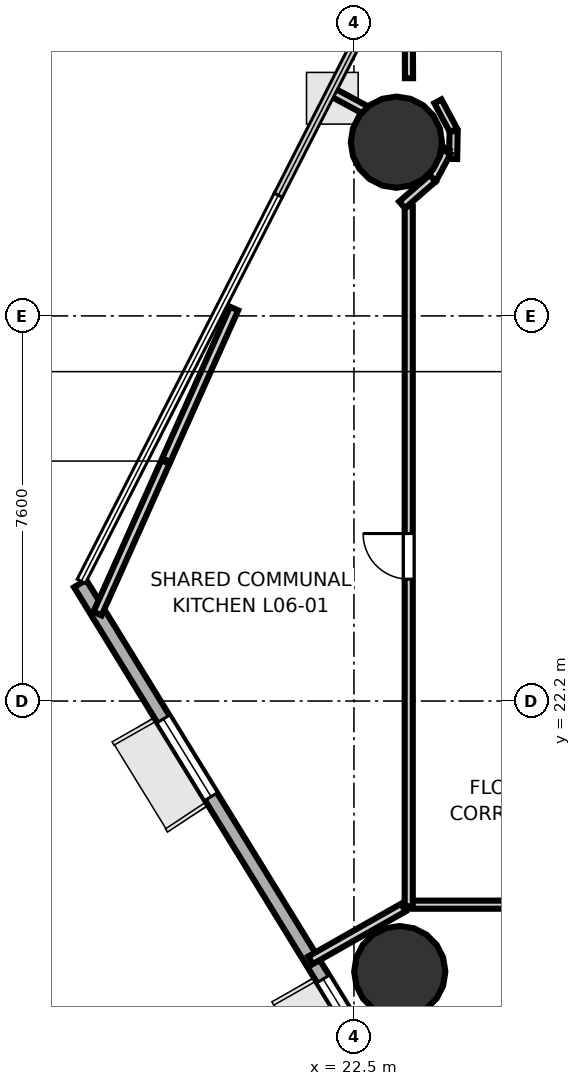
"""IFC4 building model, lengths in metres.
Left out: names, types, materials, properties, quantities, classifications, styles, units other than length and angle.
Written with IfcOpenShell. Run it as: python <this file> out.ifc"""

import sys

from ifc_helpers import new_model, si_unit, direction, frame, frame_2d, origin, origin_2d, place, context, subcontext, project, spatial, rectangle, hollow_circle, extrude, element, fill, save


model = new_model("IFC4")
c1 = context("Model", 3, precision=1e-05, world=origin(), true_north=direction((0.0, 1.0)))
c2 = subcontext(c1, "Body", "Model", "MODEL_VIEW")
j1 = project(units=[si_unit("LENGTHUNIT", "METRE"), si_unit("PLANEANGLEUNIT", "RADIAN")], contexts=[c1])
p1 = place(None, origin())
s1 = spatial("IfcSite", under=j1, at=p1, CompositionType="ELEMENT")
p2 = place(p1, origin())
s2 = spatial("IfcBuilding", under=s1, at=p2, CompositionType="ELEMENT")
p3 = place(p2, frame((0.0, 0.0, 29.4)))
s3 = spatial("IfcBuildingStorey", under=s2, at=p3, CompositionType="ELEMENT", Elevation=29.4)
for number, where, z_axis, x_axis in (
    (1, (23.338, 33.228, 0.0), (0.0, 0.0, 1.0), (1.0, 0.0, 0.0)),
    (2, (23.404, 16.86, 0.0), (0.0, 0.0, 1.0), (1.0, 0.0, 0.0)),
):
    element("IfcColumn", number, at=place(p3, frame(where, z_axis=z_axis, x_axis=x_axis)), inside=s3, PredefinedType="COLUMN", context=c2, shape_type="SweptSolid", body=[
        extrude(hollow_circle(Radius=0.9, WallThickness=0.045, at=origin_2d()), origin(), (0.0, 0.0, 1.0), 3.7),
    ])
p4 = place(p3, frame((17.096, 24.519, 0.0), z_axis=(0.0, 0.0, 1.0), x_axis=(0.523599306322, -0.851964650921, 0.0)))
e3 = element("IfcWall", 3, at=p4, inside=s3, PredefinedType="SOLIDWALL", context=c2, shape_type="SweptSolid", body=[
    extrude(rectangle(XDim=13.457, YDim=0.28, at=frame_2d((6.728, 0.0))), origin(), (0.0, 0.0, 1.0), 3.52),
])
p5 = place(p4, frame((3.137, 0.0, 0.85)))
e4 = element("IfcOpeningElement", 4, at=p5, cuts=e3, PredefinedType="OPENING", context=c2, shape_type="SweptSolid", body=[
    extrude(rectangle(XDim=1.8, YDim=2.1, at=frame_2d((0.9, 1.05))), frame((0.0, 0.15, 0.0), z_axis=(0.0, -1.0, 0.0), x_axis=(1.0, 0.0, 0.0)), (0.0, 0.0, 1.0), 0.3),
])
p6 = place(p4, frame((9.16, 0.0, 0.85)))
e5 = element("IfcOpeningElement", 5, at=p6, cuts=e3, PredefinedType="OPENING", context=c2, shape_type="SweptSolid", body=[
    extrude(rectangle(XDim=1.8, YDim=2.1, at=frame_2d((0.9, 1.05))), frame((0.0, 0.15, 0.0), z_axis=(0.0, -1.0, 0.0), x_axis=(1.0, 0.0, 0.0)), (0.0, 0.0, 1.0), 0.3),
])
p7 = place(p3, frame((24.464, 33.461, 0.0), z_axis=(0.0, 0.0, 1.0), x_axis=(-0.4715232649, 0.881853622014, 0.0)))
e6 = element("IfcWall", 6, at=p7, inside=s3, PredefinedType="PARTITIONING", context=c2, shape_type="SweptSolid", body=[
    extrude(rectangle(XDim=0.65, YDim=0.16, at=frame_2d((0.325, 0.0))), origin(), (0.0, 0.0, 1.0), 2.798),
])
p8 = place(p3, frame((23.587, 34.491, 0.0), z_axis=(0.0, 0.0, 1.0), x_axis=(-0.003825594781, 0.999992682386, 0.0)))
e7 = element("IfcWall", 7, at=p8, inside=s3, PredefinedType="PARTITIONING", context=c2, shape_type="SweptSolid", body=[
    extrude(rectangle(XDim=2.744, YDim=0.16, at=frame_2d((1.372, 0.0))), origin(), (0.0, 0.0, 1.0), 2.84),
])
p9 = place(p3, frame((33.32, 18.181, 0.0), z_axis=(0.0, 0.0, 1.0), x_axis=(-1.0, 0.0, 0.0)))
e8 = element("IfcWall", 8, at=p9, inside=s3, PredefinedType="PARTITIONING", context=c2, shape_type="SweptSolid", body=[
    extrude(rectangle(XDim=9.77, YDim=0.16, at=frame_2d((4.885, 0.0))), origin(), (0.0, 0.0, 1.0), 2.798),
])
p10 = place(p9, frame((5.695, 0.0, 0.0)))
e9 = element("IfcOpeningElement", 9, at=p10, cuts=e8, PredefinedType="OPENING", context=c2, shape_type="SweptSolid", body=[
    extrude(rectangle(XDim=0.9, YDim=2.1, at=frame_2d((0.45, 1.05))), frame((0.0, 0.09, 0.0), z_axis=(0.0, -1.0, 0.0), x_axis=(1.0, 0.0, 0.0)), (0.0, 0.0, 1.0), 0.18),
])
p11 = place(p3, frame((23.581, 18.15, 0.0), z_axis=(0.0, 0.0, 1.0), x_axis=(0.0, 1.0, 0.0)))
e10 = element("IfcWall", 10, at=p11, inside=s3, PredefinedType="PARTITIONING", context=c2, shape_type="SweptSolid", body=[
    extrude(rectangle(XDim=13.81, YDim=0.16, at=frame_2d((6.905, 0.0))), origin(), (0.0, 0.0, 1.0), 2.798),
])
p12 = place(p11, frame((6.455, 0.0, 0.0)))
e11 = element("IfcOpeningElement", 11, at=p12, cuts=e10, PredefinedType="OPENING", context=c2, shape_type="SweptSolid", body=[
    extrude(rectangle(XDim=0.9, YDim=2.1, at=frame_2d((0.45, 1.05))), frame((0.0, 0.09, 0.0), z_axis=(0.0, -1.0, 0.0), x_axis=(1.0, 0.0, 0.0)), (0.0, 0.0, 1.0), 0.18),
])
p13 = place(p3, frame((24.457, 32.897, 0.0), z_axis=(0.0, 0.0, 1.0), x_axis=(0.020031598679, 0.999799347396, 0.0)))
e12 = element("IfcWall", 12, at=p13, inside=s3, PredefinedType="PARTITIONING", context=c2, shape_type="SweptSolid", body=[
    extrude(rectangle(XDim=0.548, YDim=0.16, at=frame_2d((0.274, 0.0))), origin(), (0.0, 0.0, 1.0), 2.84),
])
p14 = place(p3, frame((22.033, 34.236, 0.0), z_axis=(0.0, 0.0, 1.0), x_axis=(0.880677298997, -0.473716682239, 0.0)))
e13 = element("IfcWall", 13, at=p14, inside=s3, PredefinedType="PLUMBINGWALL", context=c2, shape_type="SweptSolid", body=[
    extrude(rectangle(XDim=2.622, YDim=0.175, at=frame_2d((1.311, 0.0))), origin(), (0.0, 0.0, 1.0), 2.798),
])
p15 = place(p3, frame((24.33, 33.036, 0.0), z_axis=(0.0, 0.0, 1.0), x_axis=(-0.473395741492, -0.880849857772, 0.0)))
e14 = element("IfcWall", 14, at=p15, inside=s3, PredefinedType="PLUMBINGWALL", context=c2, shape_type="SweptSolid", body=[
    extrude(rectangle(XDim=0.6, YDim=0.175, at=frame_2d((0.3, 0.0))), origin(), (0.0, 0.0, 1.0), 2.84),
])
p16 = place(p3, frame((24.053, 32.516, 0.0), z_axis=(0.0, 0.0, 1.0), x_axis=(-0.753993768579, -0.656881569953, 0.0)))
e15 = element("IfcWall", 15, at=p16, inside=s3, PredefinedType="PLUMBINGWALL", context=c2, shape_type="SweptSolid", body=[
    extrude(rectangle(XDim=0.8, YDim=0.175, at=frame_2d((0.4, 0.0))), origin(), (0.0, 0.0, 1.0), 2.798),
])
p17 = place(p3, frame((23.475, 18.124, 0.0), z_axis=(0.0, 0.0, 1.0), x_axis=(-0.869707412207, -0.493567641921, 0.0)))
e16 = element("IfcWall", 16, at=p17, inside=s3, PredefinedType="PLUMBINGWALL", context=c2, shape_type="SweptSolid", body=[
    extrude(rectangle(XDim=2.108, YDim=0.175, at=frame_2d((1.054, 0.0))), origin(), (0.0, 0.0, 1.0), 2.798),
])
p18 = place(p3, frame((17.44, 23.926, 0.0), z_axis=(0.0, 0.0, 1.0), x_axis=(0.408647706238, 0.912692200135, 0.0)))
e17 = element("IfcWall", 17, at=p18, inside=s3, PredefinedType="PLUMBINGWALL", context=c2, shape_type="SweptSolid", body=[
    extrude(rectangle(XDim=6.595, YDim=0.175, at=frame_2d((3.297, 0.0))), origin(), (0.0, 0.0, 1.0), 2.84),
])
p19 = place(p12, origin())
e18 = element("IfcDoor", 18, at=p19, inside=s3, OperationType="SINGLE_SWING_RIGHT", PredefinedType="DOOR", context=c2, shape_type="SweptSolid", body=[
    extrude(rectangle(XDim=0.9, YDim=2.1, at=frame_2d((0.45, 1.05))), frame((0.0, 0.025, 0.0), z_axis=(0.0, -1.0, 0.0), x_axis=(1.0, 0.0, 0.0)), (0.0, 0.0, 1.0), 0.05),
])
fill(e11, e18)
p20 = place(p5, origin())
e19 = element("IfcWindow", 19, at=p20, inside=s3, PartitioningType="SINGLE_PANEL", PredefinedType="WINDOW", context=c2, shape_type="SweptSolid", body=[
    extrude(rectangle(XDim=1.8, YDim=2.1, at=frame_2d((0.9, 1.05))), frame((0.0, 0.03, 0.0), z_axis=(0.0, -1.0, 0.0), x_axis=(1.0, 0.0, 0.0)), (0.0, 0.0, 1.0), 0.06),
])
fill(e4, e19)
p21 = place(p6, origin())
e20 = element("IfcWindow", 20, at=p21, inside=s3, PartitioningType="SINGLE_PANEL", PredefinedType="WINDOW", context=c2, shape_type="SweptSolid", body=[
    extrude(rectangle(XDim=1.8, YDim=2.1, at=frame_2d((0.9, 1.05))), frame((0.0, 0.03, 0.0), z_axis=(0.0, -1.0, 0.0), x_axis=(1.0, 0.0, 0.0)), (0.0, 0.0, 1.0), 0.06),
])
fill(e5, e20)
save(model, sys.argv[1])
